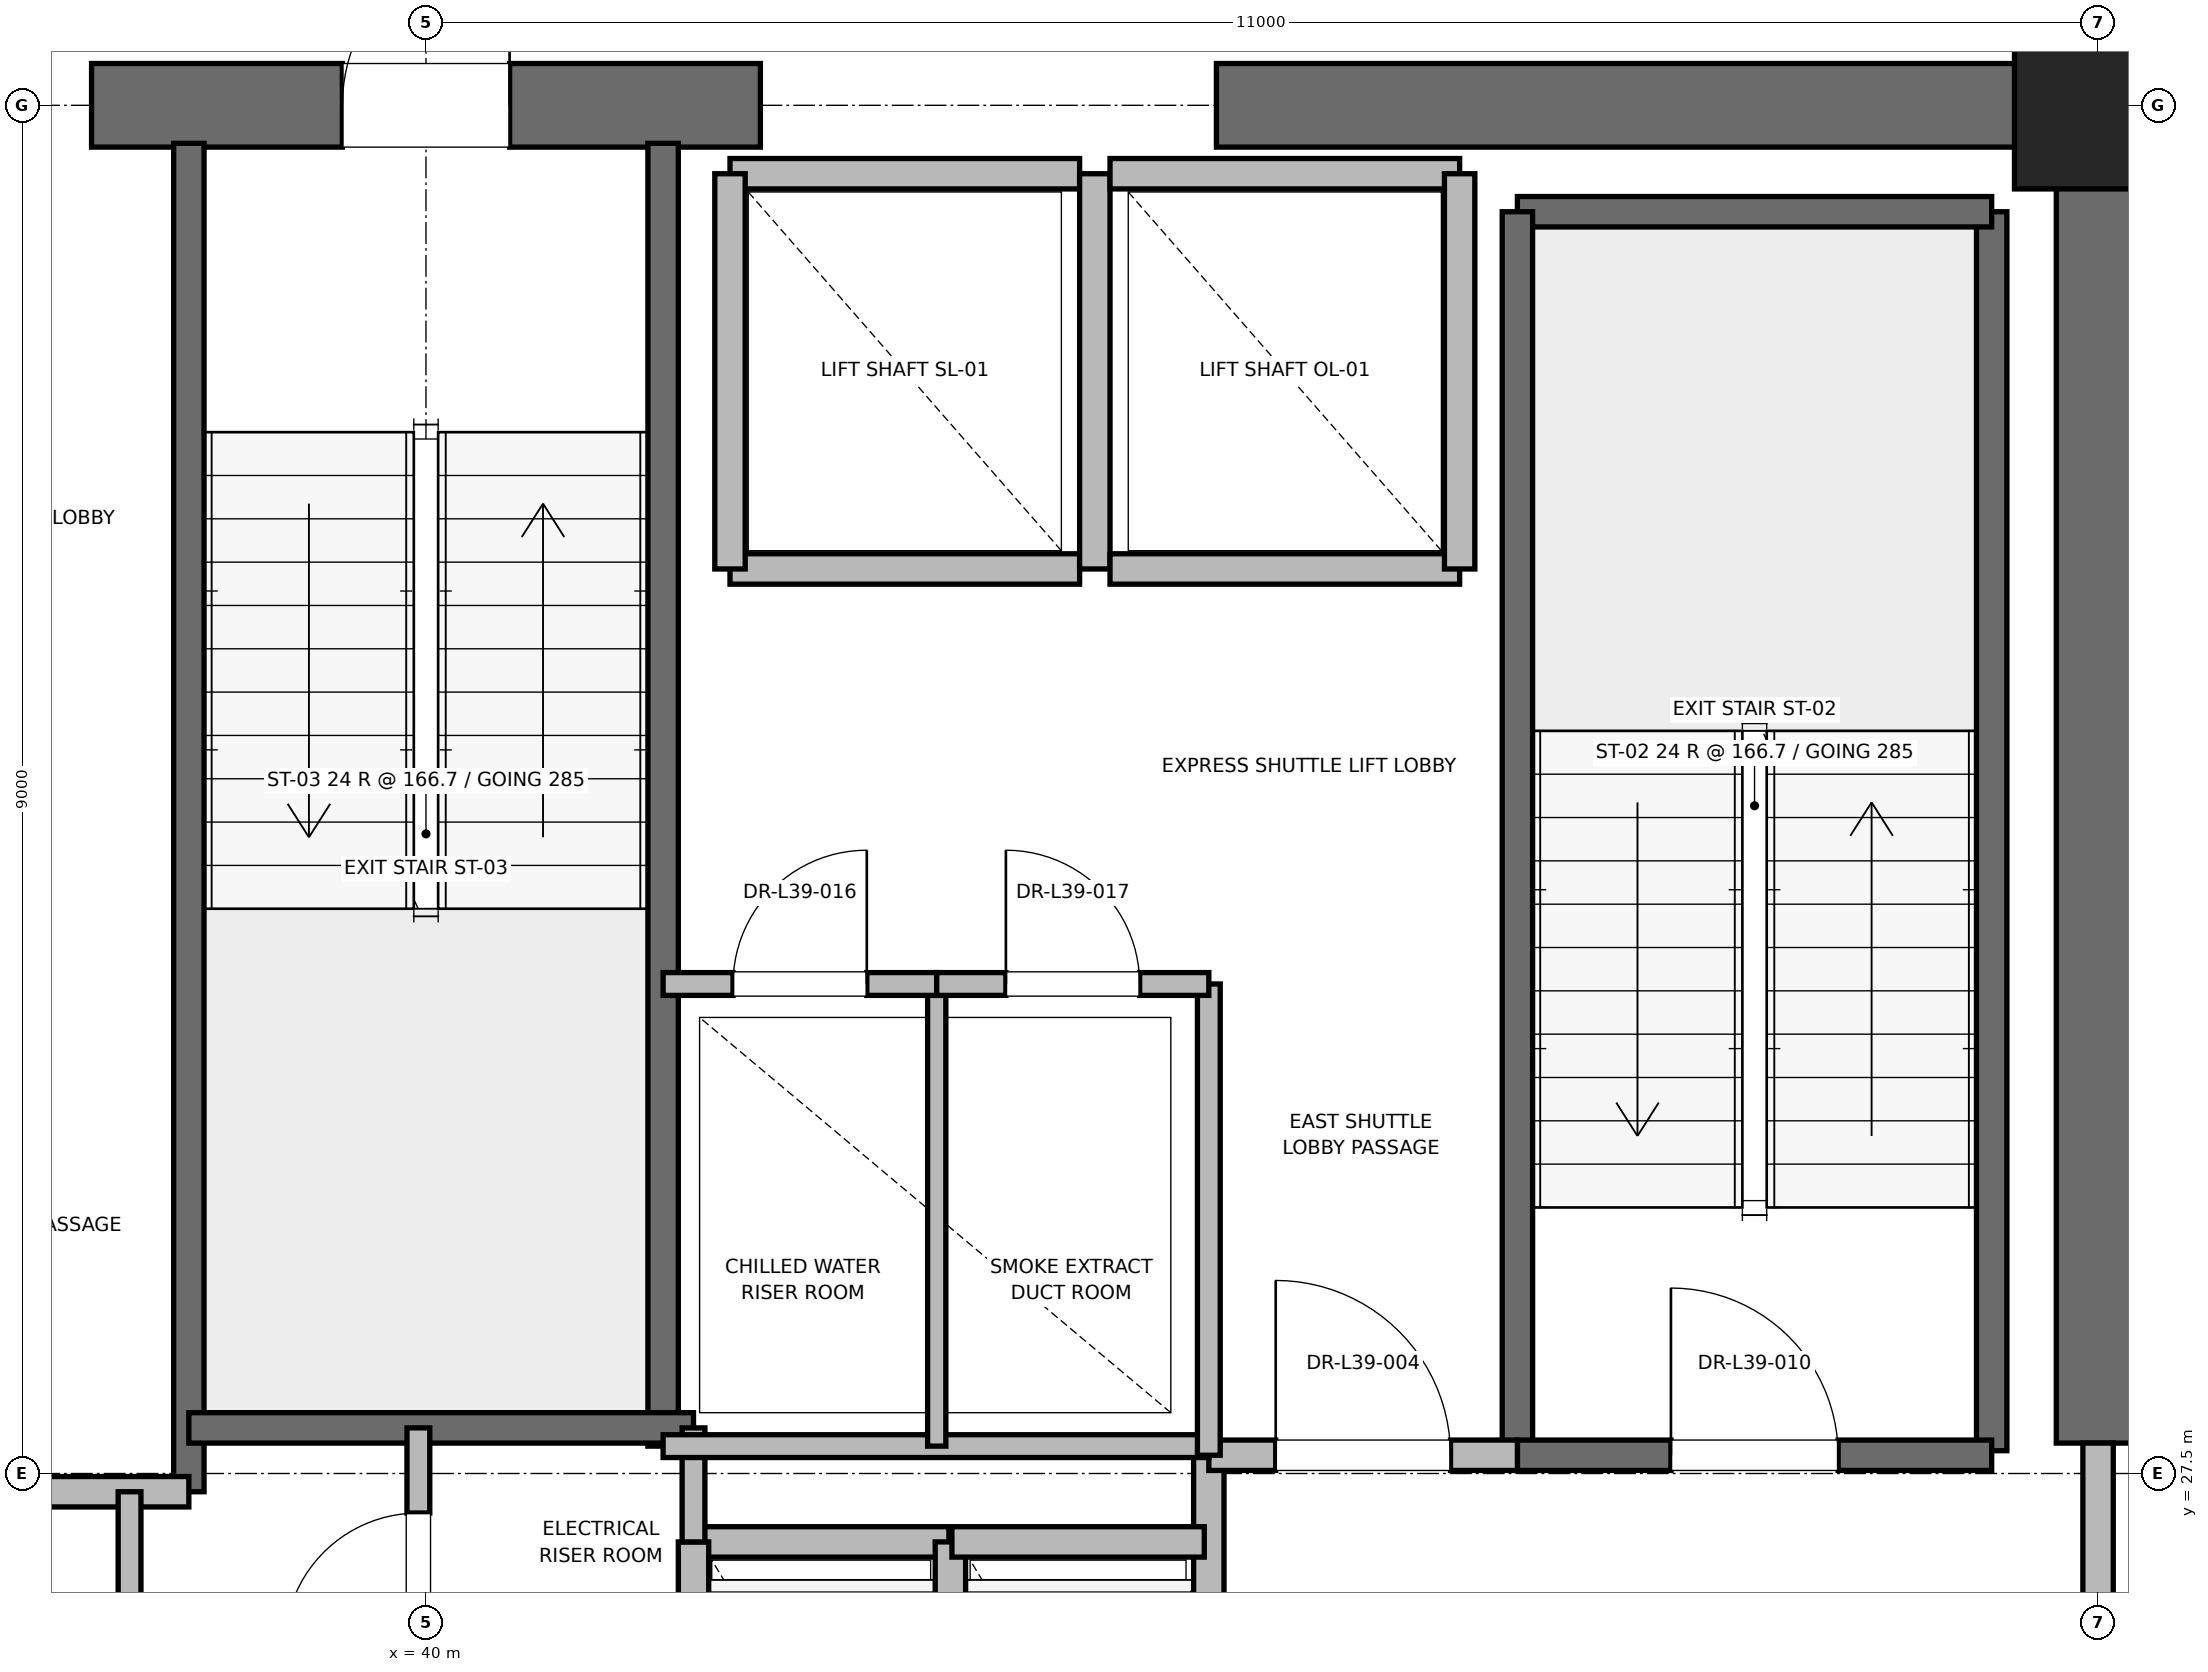
"""IFC4 building model, lengths in metres.
Left out: names, types, materials, properties, quantities, classifications, styles, units other than length and angle.
Written with IfcOpenShell. Run it as: python <this file> out.ifc"""

import sys

from ifc_helpers import new_model, si_unit, direction, frame, frame_2d, origin, origin_2d, place, context, subcontext, project, spatial, rectangle, extrude, element, fill, save


model = new_model("IFC4")
c1 = context("Model", 3, precision=1e-05, world=origin(), true_north=direction((0.0, 1.0)))
c2 = subcontext(c1, "Body", "Model", "MODEL_VIEW")
j1 = project(units=[si_unit("LENGTHUNIT", "METRE"), si_unit("PLANEANGLEUNIT", "RADIAN")], contexts=[c1])
p1 = place(None, origin())
s1 = spatial("IfcSite", under=j1, at=p1, CompositionType="ELEMENT")
p2 = place(p1, origin())
s2 = spatial("IfcBuilding", under=s1, at=p2, CompositionType="ELEMENT")
p3 = place(p2, frame((0.0, 0.0, 168.4)))
s3 = spatial("IfcBuildingStorey", under=s2, at=p3, CompositionType="ELEMENT", Elevation=168.4)
p4 = place(p3, frame((51.0, 36.5, 0.0), z_axis=(0.0, 0.0, 1.0), x_axis=(1.0, 0.0, 0.0)))
e1 = element("IfcColumn", 1, at=p4, inside=s3, PredefinedType="PILASTER", context=c2, shape_type="SweptSolid", body=[
    extrude(rectangle(XDim=1.1, YDim=1.1, at=origin_2d()), origin(), (0.0, 0.0, 1.0), 4.0),
])
p5 = place(p3, frame((37.8, 36.5, 0.0), z_axis=(0.0, 0.0, 1.0), x_axis=(1.0, 0.0, 0.0)))
e2 = element("IfcWall", 2, at=p5, inside=s3, PredefinedType="SHEAR", context=c2, shape_type="SweptSolid", body=[
    extrude(rectangle(XDim=4.4, YDim=0.55, at=frame_2d((2.2, 0.0))), origin(), (0.0, 0.0, 1.0), 3.775),
])
p6 = place(p5, frame((1.65, 0.0, 0.0)))
e3 = element("IfcOpeningElement", 3, at=p6, cuts=e2, PredefinedType="OPENING", context=c2, shape_type="SweptSolid", body=[
    extrude(rectangle(XDim=1.1, YDim=2.15, at=frame_2d((0.55, 1.075))), frame((0.0, 0.275, 0.0), z_axis=(0.0, -1.0, 0.0), x_axis=(1.0, 0.0, 0.0)), (0.0, 0.0, 1.0), 0.55),
])
p7 = place(p3, frame((45.2, 36.5, 0.0), z_axis=(0.0, 0.0, 1.0), x_axis=(1.0, 0.0, 0.0)))
e4 = element("IfcWall", 4, at=p7, inside=s3, PredefinedType="SHEAR", context=c2, shape_type="SweptSolid", body=[
    extrude(rectangle(XDim=5.8, YDim=0.55, at=frame_2d((2.9, 0.0))), origin(), (0.0, 0.0, 1.0), 3.775),
])
p8 = place(p3, frame((51.0, 27.7, 0.0), z_axis=(0.0, 0.0, 1.0), x_axis=(0.0, 1.0, 0.0)))
e5 = element("IfcWall", 5, at=p8, inside=s3, PredefinedType="SHEAR", context=c2, shape_type="SweptSolid", body=[
    extrude(rectangle(XDim=8.8, YDim=0.55, at=frame_2d((4.4, 0.0))), origin(), (0.0, 0.0, 1.0), 3.775),
])
p9 = place(p3, frame((50.3, 27.65, 0.0), z_axis=(0.0, 0.0, 1.0), x_axis=(0.0, 1.0, 0.0)))
e6 = element("IfcWall", 6, at=p9, inside=s3, PredefinedType="SOLIDWALL", context=c2, shape_type="SweptSolid", body=[
    extrude(rectangle(XDim=8.15, YDim=0.2, at=frame_2d((4.075, 0.0))), origin(), (0.0, 0.0, 1.0), 3.775),
])
p10 = place(p3, frame((47.18, 35.8, 0.0), z_axis=(0.0, 0.0, 1.0), x_axis=(1.0, 0.0, 0.0)))
e7 = element("IfcWall", 7, at=p10, inside=s3, PredefinedType="SOLIDWALL", context=c2, shape_type="SweptSolid", body=[
    extrude(rectangle(XDim=3.12, YDim=0.2, at=frame_2d((1.56, 0.0))), origin(), (0.0, 0.0, 1.0), 3.775),
])
p11 = place(p3, frame((47.18, 27.62, 0.0), z_axis=(0.0, 0.0, 1.0), x_axis=(0.0, 1.0, 0.0)))
e8 = element("IfcWall", 8, at=p11, inside=s3, PredefinedType="SOLIDWALL", context=c2, shape_type="SweptSolid", body=[
    extrude(rectangle(XDim=8.18, YDim=0.2, at=frame_2d((4.09, 0.0))), origin(), (0.0, 0.0, 1.0), 3.775),
])
p12 = place(p3, frame((47.18, 27.62, 0.0), z_axis=(0.0, 0.0, 1.0), x_axis=(1.0, 0.0, 0.0)))
e9 = element("IfcWall", 9, at=p12, inside=s3, PredefinedType="SOLIDWALL", context=c2, shape_type="SweptSolid", body=[
    extrude(rectangle(XDim=3.12, YDim=0.2, at=frame_2d((1.56, 0.0))), origin(), (0.0, 0.0, 1.0), 3.775),
])
p13 = place(p12, frame((1.01, 0.0, 0.0)))
e10 = element("IfcOpeningElement", 10, at=p13, cuts=e9, PredefinedType="OPENING", context=c2, shape_type="SweptSolid", body=[
    extrude(rectangle(XDim=1.1, YDim=2.15, at=frame_2d((0.55, 1.075))), frame((0.0, 0.1, 0.0), z_axis=(0.0, -1.0, 0.0), x_axis=(1.0, 0.0, 0.0)), (0.0, 0.0, 1.0), 0.2),
])
p14 = place(p3, frame((38.44, 27.38, 0.0), z_axis=(0.0, 0.0, 1.0), x_axis=(0.0, 1.0, 0.0)))
e11 = element("IfcWall", 11, at=p14, inside=s3, PredefinedType="SOLIDWALL", context=c2, shape_type="SweptSolid", body=[
    extrude(rectangle(XDim=8.87, YDim=0.2, at=frame_2d((4.435, 0.0))), origin(), (0.0, 0.0, 1.0), 3.775),
])
p15 = place(p3, frame((41.56, 27.68, 0.0), z_axis=(0.0, 0.0, 1.0), x_axis=(0.0, 1.0, 0.0)))
e12 = element("IfcWall", 12, at=p15, inside=s3, PredefinedType="SOLIDWALL", context=c2, shape_type="SweptSolid", body=[
    extrude(rectangle(XDim=8.57, YDim=0.2, at=frame_2d((4.285, 0.0))), origin(), (0.0, 0.0, 1.0), 3.775),
])
p16 = place(p3, frame((38.44, 27.8, 0.0), z_axis=(0.0, 0.0, 1.0), x_axis=(1.0, 0.0, 0.0)))
e13 = element("IfcWall", 13, at=p16, inside=s3, PredefinedType="SOLIDWALL", context=c2, shape_type="SweptSolid", body=[
    extrude(rectangle(XDim=3.32, YDim=0.2, at=frame_2d((1.66, 0.0))), origin(), (0.0, 0.0, 1.0), 3.775),
])
p17 = place(p3, frame((32.82, 27.38, 0.0), z_axis=(0.0, 0.0, 1.0), x_axis=(1.0, 0.0, 0.0)))
e14 = element("IfcWall", 14, at=p17, inside=s3, PredefinedType="PARTITIONING", context=c2, shape_type="SweptSolid", body=[
    extrude(rectangle(XDim=5.62, YDim=0.2, at=frame_2d((2.81, 0.0))), origin(), (0.0, 0.0, 1.0), 3.775),
])
p18 = place(p3, frame((45.15, 24.25, 0.0), z_axis=(0.0, 0.0, 1.0), x_axis=(0.0, 1.0, 0.0)))
e15 = element("IfcWall", 15, at=p18, inside=s3, PredefinedType="PARTITIONING", context=c2, shape_type="SweptSolid", body=[
    extrude(rectangle(XDim=3.37, YDim=0.2, at=frame_2d((1.685, 0.0))), origin(), (0.0, 0.0, 1.0), 3.775),
])
p19 = place(p3, frame((45.15, 27.62, 0.0), z_axis=(0.0, 0.0, 1.0), x_axis=(1.0, 0.0, 0.0)))
e16 = element("IfcWall", 16, at=p19, inside=s3, PredefinedType="PARTITIONING", context=c2, shape_type="SweptSolid", body=[
    extrude(rectangle(XDim=2.03, YDim=0.2, at=frame_2d((1.015, 0.0))), origin(), (0.0, 0.0, 1.0), 3.775),
])
p20 = place(p19, frame((0.44, 0.0, 0.0)))
e17 = element("IfcOpeningElement", 17, at=p20, cuts=e16, PredefinedType="OPENING", context=c2, shape_type="SweptSolid", body=[
    extrude(rectangle(XDim=1.15, YDim=2.2, at=frame_2d((0.575, 1.1))), frame((0.0, 0.1, 0.0), z_axis=(0.0, -1.0, 0.0), x_axis=(1.0, 0.0, 0.0)), (0.0, 0.0, 1.0), 0.2),
])
p21 = place(p3, frame((51.0, 24.3, 0.0), z_axis=(0.0, 0.0, 1.0), x_axis=(0.0, 1.0, 0.0)))
e18 = element("IfcWall", 18, at=p21, inside=s3, PredefinedType="PARTITIONING", context=c2, shape_type="SweptSolid", body=[
    extrude(rectangle(XDim=3.4, YDim=0.2, at=frame_2d((1.7, 0.0))), origin(), (0.0, 0.0, 1.0), 2.755),
])
p22 = place(p21, frame((1.125, 0.0, 0.0)))
e19 = element("IfcOpeningElement", 19, at=p22, cuts=e18, PredefinedType="OPENING", context=c2, shape_type="SweptSolid", body=[
    extrude(rectangle(XDim=1.15, YDim=2.2, at=frame_2d((0.575, 1.1))), frame((0.0, 0.1, 0.0), z_axis=(0.0, -1.0, 0.0), x_axis=(1.0, 0.0, 0.0)), (0.0, 0.0, 1.0), 0.2),
])
p23 = place(p3, frame((43.44, 27.05, 0.0), z_axis=(0.0, 0.0, 1.0), x_axis=(-1.0, 0.0, 0.0)))
e20 = element("IfcWall", 20, at=p23, inside=s3, PredefinedType="SOLIDWALL", context=c2, shape_type="SweptSolid", body=[
    extrude(rectangle(XDim=1.68, YDim=0.2, at=frame_2d((0.84, 0.0))), origin(), (0.0, 0.0, 1.0), 3.775),
])
for number, where, z_axis, x_axis in (
    (21, (41.76, 27.05, 0.0), (0.0, 0.0, 1.0), (0.0, -1.0, 0.0)),
    (22, (43.45, 24.45, 0.0), (0.0, 0.0, 1.0), (0.0, 1.0, 0.0)),
):
    element("IfcWall", number, at=place(p3, frame(where, z_axis=z_axis, x_axis=x_axis)), inside=s3, PredefinedType="SOLIDWALL", context=c2, shape_type="SweptSolid", body=[
        extrude(rectangle(XDim=2.6, YDim=0.2, at=frame_2d((1.3, 0.0))), origin(), (0.0, 0.0, 1.0), 3.775),
    ])
p24 = place(p3, frame((45.12, 27.05, 0.0), z_axis=(0.0, 0.0, 1.0), x_axis=(-1.0, 0.0, 0.0)))
e23 = element("IfcWall", 23, at=p24, inside=s3, PredefinedType="SOLIDWALL", context=c2, shape_type="SweptSolid", body=[
    extrude(rectangle(XDim=1.66, YDim=0.2, at=frame_2d((0.83, 0.0))), origin(), (0.0, 0.0, 1.0), 3.775),
])
p25 = place(p3, frame((42.0, 33.45, 0.0), z_axis=(0.0, 0.0, 1.0), x_axis=(1.0, 0.0, 0.0)))
e24 = element("IfcWall", 24, at=p25, inside=s3, PredefinedType="SOLIDWALL", context=c2, shape_type="SweptSolid", body=[
    extrude(rectangle(XDim=2.3, YDim=0.2, at=frame_2d((1.15, 0.0))), origin(), (0.0, 0.0, 1.0), 3.775),
])
p26 = place(p3, frame((44.3, 36.05, 0.0), z_axis=(0.0, 0.0, 1.0), x_axis=(-1.0, 0.0, 0.0)))
e25 = element("IfcWall", 25, at=p26, inside=s3, PredefinedType="SOLIDWALL", context=c2, shape_type="SweptSolid", body=[
    extrude(rectangle(XDim=2.3, YDim=0.2, at=frame_2d((1.15, 0.0))), origin(), (0.0, 0.0, 1.0), 2.755),
])
for number, where, z_axis, x_axis in (
    (26, (42.0, 36.05, 0.0), (0.0, 0.0, 1.0), (0.0, -1.0, 0.0)),
    (27, (44.4, 33.45, 0.0), (0.0, 0.0, 1.0), (0.0, 1.0, 0.0)),
):
    element("IfcWall", number, at=place(p3, frame(where, z_axis=z_axis, x_axis=x_axis)), inside=s3, PredefinedType="SOLIDWALL", context=c2, shape_type="SweptSolid", body=[
        extrude(rectangle(XDim=2.6, YDim=0.2, at=frame_2d((1.3, 0.0))), origin(), (0.0, 0.0, 1.0), 2.755),
    ])
p27 = place(p3, frame((44.5, 33.45, 0.0), z_axis=(0.0, 0.0, 1.0), x_axis=(1.0, 0.0, 0.0)))
e28 = element("IfcWall", 28, at=p27, inside=s3, PredefinedType="SOLIDWALL", context=c2, shape_type="SweptSolid", body=[
    extrude(rectangle(XDim=2.3, YDim=0.2, at=frame_2d((1.15, 0.0))), origin(), (0.0, 0.0, 1.0), 3.775),
])
p28 = place(p3, frame((46.8, 36.05, 0.0), z_axis=(0.0, 0.0, 1.0), x_axis=(-1.0, 0.0, 0.0)))
e29 = element("IfcWall", 29, at=p28, inside=s3, PredefinedType="SOLIDWALL", context=c2, shape_type="SweptSolid", body=[
    extrude(rectangle(XDim=2.3, YDim=0.2, at=frame_2d((1.15, 0.0))), origin(), (0.0, 0.0, 1.0), 2.755),
])
p29 = place(p3, frame((46.8, 33.45, 0.0), z_axis=(0.0, 0.0, 1.0), x_axis=(0.0, 1.0, 0.0)))
e30 = element("IfcWall", 30, at=p29, inside=s3, PredefinedType="SOLIDWALL", context=c2, shape_type="SweptSolid", body=[
    extrude(rectangle(XDim=2.6, YDim=0.2, at=frame_2d((1.3, 0.0))), origin(), (0.0, 0.0, 1.0), 3.775),
])
p30 = place(p3, frame((41.76, 27.05, 0.0), z_axis=(0.0, 0.0, 1.0), x_axis=(0.0, 1.0, 0.0)))
e31 = element("IfcWall", 31, at=p30, inside=s3, PredefinedType="PARTITIONING", context=c2, shape_type="SweptSolid", body=[
    extrude(rectangle(XDim=0.75, YDim=0.15, at=frame_2d((0.375, 0.0))), origin(), (0.0, 0.0, 1.0), 2.85),
])
p31 = place(p3, frame((39.95, 25.8, 0.0), z_axis=(0.0, 0.0, 1.0), x_axis=(0.0, 1.0, 0.0)))
e32 = element("IfcWall", 32, at=p31, inside=s3, PredefinedType="PARTITIONING", context=c2, shape_type="SweptSolid", body=[
    extrude(rectangle(XDim=2.0, YDim=0.15, at=frame_2d((1.0, 0.0))), origin(), (0.0, 0.0, 1.0), 2.85),
])
p32 = place(p31, frame((0.56, 0.0, 0.0)))
e33 = element("IfcOpeningElement", 33, at=p32, cuts=e32, PredefinedType="OPENING", context=c2, shape_type="SweptSolid", body=[
    extrude(rectangle(XDim=0.88, YDim=2.1, at=frame_2d((0.44, 1.05))), frame((0.0, 0.075, 0.0), z_axis=(0.0, -1.0, 0.0), x_axis=(1.0, 0.0, 0.0)), (0.0, 0.0, 1.0), 0.15),
])
p33 = place(p3, frame((38.05, 23.06, 0.0), z_axis=(0.0, 0.0, 1.0), x_axis=(0.0, 1.0, 0.0)))
e34 = element("IfcWall", 34, at=p33, inside=s3, PredefinedType="PARTITIONING", context=c2, shape_type="SweptSolid", body=[
    extrude(rectangle(XDim=4.32, YDim=0.15, at=frame_2d((2.16, 0.0))), origin(), (0.0, 0.0, 1.0), 2.85),
])
p34 = place(p33, frame((1.66, 0.0, 0.0)))
e35 = element("IfcOpeningElement", 35, at=p34, cuts=e34, PredefinedType="OPENING", context=c2, shape_type="SweptSolid", body=[
    extrude(rectangle(XDim=1.0, YDim=2.15, at=frame_2d((0.5, 1.075))), frame((0.0, 0.075, 0.0), z_axis=(0.0, -1.0, 0.0), x_axis=(1.0, 0.0, 0.0)), (0.0, 0.0, 1.0), 0.15),
])
p35 = place(p3, frame((41.56, 27.68, 0.0), z_axis=(0.0, 0.0, 1.0), x_axis=(1.0, 0.0, 0.0)))
e36 = element("IfcWall", 36, at=p35, inside=s3, PredefinedType="PARTITIONING", context=c2, shape_type="SweptSolid", body=[
    extrude(rectangle(XDim=3.59, YDim=0.15, at=frame_2d((1.795, 0.0))), origin(), (0.0, 0.0, 1.0), 2.85),
])
p36 = place(p3, frame((45.15, 27.62, 0.0), z_axis=(0.0, 0.0, 1.0), x_axis=(0.0, 1.0, 0.0)))
e37 = element("IfcWall", 37, at=p36, inside=s3, PredefinedType="PARTITIONING", context=c2, shape_type="SweptSolid", body=[
    extrude(rectangle(XDim=3.1, YDim=0.15, at=frame_2d((1.55, 0.0))), origin(), (0.0, 0.0, 1.0), 2.85),
])
p37 = place(p3, frame((43.36, 27.68, 0.0), z_axis=(0.0, 0.0, 1.0), x_axis=(0.0, 1.0, 0.0)))
e38 = element("IfcWall", 38, at=p37, inside=s3, PredefinedType="PARTITIONING", context=c2, shape_type="SweptSolid", body=[
    extrude(rectangle(XDim=3.04, YDim=0.12, at=frame_2d((1.52, 0.0))), origin(), (0.0, 0.0, 1.0), 2.85),
])
p38 = place(p3, frame((41.56, 30.72, 0.0), z_axis=(0.0, 0.0, 1.0), x_axis=(1.0, 0.0, 0.0)))
e39 = element("IfcWall", 39, at=p38, inside=s3, PredefinedType="PARTITIONING", context=c2, shape_type="SweptSolid", body=[
    extrude(rectangle(XDim=1.8, YDim=0.15, at=frame_2d((0.9, 0.0))), origin(), (0.0, 0.0, 1.0), 2.85),
])
p39 = place(p38, frame((0.46, 0.0, 0.0)))
e40 = element("IfcOpeningElement", 40, at=p39, cuts=e39, PredefinedType="OPENING", context=c2, shape_type="SweptSolid", body=[
    extrude(rectangle(XDim=0.88, YDim=2.1, at=frame_2d((0.44, 1.05))), frame((0.0, 0.075, 0.0), z_axis=(0.0, -1.0, 0.0), x_axis=(1.0, 0.0, 0.0)), (0.0, 0.0, 1.0), 0.15),
])
p40 = place(p3, frame((43.36, 30.72, 0.0), z_axis=(0.0, 0.0, 1.0), x_axis=(1.0, 0.0, 0.0)))
e41 = element("IfcWall", 41, at=p40, inside=s3, PredefinedType="PARTITIONING", context=c2, shape_type="SweptSolid", body=[
    extrude(rectangle(XDim=1.79, YDim=0.15, at=frame_2d((0.895, 0.0))), origin(), (0.0, 0.0, 1.0), 2.85),
])
p41 = place(p40, frame((0.455, 0.0, 0.0)))
e42 = element("IfcOpeningElement", 42, at=p41, cuts=e41, PredefinedType="OPENING", context=c2, shape_type="SweptSolid", body=[
    extrude(rectangle(XDim=0.88, YDim=2.1, at=frame_2d((0.44, 1.05))), frame((0.0, 0.075, 0.0), z_axis=(0.0, -1.0, 0.0), x_axis=(1.0, 0.0, 0.0)), (0.0, 0.0, 1.0), 0.15),
])
p42 = place(p13, origin())
e43 = element("IfcDoor", 43, at=p42, inside=s3, OperationType="SINGLE_SWING_LEFT", PredefinedType="DOOR", context=c2, shape_type="SweptSolid", body=[
    extrude(rectangle(XDim=1.1, YDim=2.15, at=frame_2d((0.55, 1.075))), frame((0.0, 0.025, 0.0), z_axis=(0.0, -1.0, 0.0), x_axis=(1.0, 0.0, 0.0)), (0.0, 0.0, 1.0), 0.05),
])
fill(e10, e43)
p43 = place(p6, origin())
e44 = element("IfcDoor", 44, at=p43, inside=s3, OperationType="SINGLE_SWING_RIGHT", PredefinedType="DOOR", context=c2, shape_type="SweptSolid", body=[
    extrude(rectangle(XDim=1.1, YDim=2.15, at=frame_2d((0.55, 1.075))), frame((0.0, 0.025, 0.0), z_axis=(0.0, -1.0, 0.0), x_axis=(1.0, 0.0, 0.0)), (0.0, 0.0, 1.0), 0.05),
])
fill(e3, e44)
p44 = place(p20, origin())
e45 = element("IfcDoor", 45, at=p44, inside=s3, OperationType="SINGLE_SWING_LEFT", PredefinedType="DOOR", context=c2, shape_type="SweptSolid", body=[
    extrude(rectangle(XDim=1.15, YDim=2.2, at=frame_2d((0.575, 1.1))), frame((0.0, 0.025, 0.0), z_axis=(0.0, -1.0, 0.0), x_axis=(1.0, 0.0, 0.0)), (0.0, 0.0, 1.0), 0.05),
])
fill(e17, e45)
p45 = place(p32, origin())
e46 = element("IfcDoor", 46, at=p45, inside=s3, OperationType="SINGLE_SWING_LEFT", PredefinedType="DOOR", context=c2, shape_type="SweptSolid", body=[
    extrude(rectangle(XDim=0.88, YDim=2.1, at=frame_2d((0.44, 1.05))), frame((0.0, 0.025, 0.0), z_axis=(0.0, -1.0, 0.0), x_axis=(1.0, 0.0, 0.0)), (0.0, 0.0, 1.0), 0.05),
])
fill(e33, e46)
p46 = place(p39, origin())
e47 = element("IfcDoor", 47, at=p46, inside=s3, OperationType="SINGLE_SWING_RIGHT", PredefinedType="DOOR", context=c2, shape_type="SweptSolid", body=[
    extrude(rectangle(XDim=0.88, YDim=2.1, at=frame_2d((0.44, 1.05))), frame((0.0, 0.025, 0.0), z_axis=(0.0, -1.0, 0.0), x_axis=(1.0, 0.0, 0.0)), (0.0, 0.0, 1.0), 0.05),
])
fill(e40, e47)
p47 = place(p41, origin())
e48 = element("IfcDoor", 48, at=p47, inside=s3, OperationType="SINGLE_SWING_LEFT", PredefinedType="DOOR", context=c2, shape_type="SweptSolid", body=[
    extrude(rectangle(XDim=0.88, YDim=2.1, at=frame_2d((0.44, 1.05))), frame((0.0, 0.025, 0.0), z_axis=(0.0, -1.0, 0.0), x_axis=(1.0, 0.0, 0.0)), (0.0, 0.0, 1.0), 0.05),
])
fill(e42, e48)
save(model, sys.argv[1])
